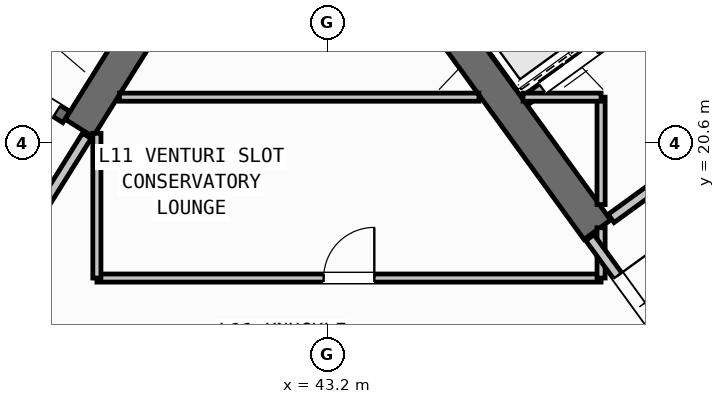
"""IFC4 building model, lengths in metres.
Left out: names, types, materials, properties, quantities, classifications, styles, units other than length and angle.
Written with IfcOpenShell. Run it as: python <this file> out.ifc"""

import sys

from ifc_helpers import new_model, si_unit, direction, frame, frame_2d, origin, place, context, subcontext, project, spatial, rectangle, extrude, source, transform, mapped, element, fill, save


model = new_model("IFC4")
c1 = context("Model", 3, precision=1e-05, world=origin(), true_north=direction((0.0, 1.0)))
c2 = subcontext(c1, "Body", "Model", "MODEL_VIEW")
j1 = project(units=[si_unit("LENGTHUNIT", "METRE"), si_unit("PLANEANGLEUNIT", "RADIAN")], contexts=[c1])
p1 = place(None, origin())
s1 = spatial("IfcSite", under=j1, at=p1, CompositionType="ELEMENT")
p2 = place(p1, origin())
s2 = spatial("IfcBuilding", under=s1, at=p2, CompositionType="ELEMENT")
p3 = place(p2, frame((0.0, 0.0, 45.6)))
s3 = spatial("IfcBuildingStorey", under=s2, at=p3, CompositionType="ELEMENT", Elevation=45.6)
p4 = place(p3, frame((40.168, 23.88, 0.0), z_axis=(0.0, 0.0, 1.0), x_axis=(-0.529893103397, -0.8480644427, 0.0)))
e1 = element("IfcWall", 1, at=p4, inside=s3, PredefinedType="SHEAR", context=c2, shape_type="SweptSolid", body=[
    extrude(rectangle(XDim=3.525, YDim=0.65, at=frame_2d((1.763, 0.0))), origin(), (0.0, 0.0, 1.0), 3.35),
])
p5 = place(p3, frame((48.526, 18.884, 0.0), z_axis=(0.0, 0.0, 1.0), x_axis=(-0.58777996584, 0.809020835181, 0.0)))
e2 = element("IfcWall", 2, at=p5, inside=s3, PredefinedType="SHEAR", context=c2, shape_type="SweptSolid", body=[
    extrude(rectangle(XDim=6.375, YDim=0.65, at=frame_2d((3.188, 0.0))), origin(), (0.0, 0.0, 1.0), 3.35),
])
p6 = place(p3, frame((38.046, 21.108, 0.0), z_axis=(0.0, 0.0, 1.0), x_axis=(-0.848054434086, 0.529909121291, 0.0)))
e3 = element("IfcWall", 3, at=p6, inside=s3, PredefinedType="SHEAR", context=c2, shape_type="SweptSolid", body=[
    extrude(rectangle(XDim=7.33, YDim=0.26, at=frame_2d((3.665, 0.0))), origin(), (0.0, 0.0, 1.0), 3.35),
])
p7 = place(p6, frame((0.22, 0.0, 0.0)))
e4 = element("IfcOpeningElement", 4, at=p7, cuts=e3, PredefinedType="OPENING", context=c2, shape_type="SweptSolid", body=[
    extrude(rectangle(XDim=1.1, YDim=2.1, at=frame_2d((0.55, 1.05))), frame((0.0, 0.14, 0.0), z_axis=(0.0, -1.0, 0.0), x_axis=(1.0, 0.0, 0.0)), (0.0, 0.0, 1.0), 0.28),
])
p8 = place(p3, frame((47.106, 21.437, 0.0), z_axis=(0.0, 0.0, 1.0), x_axis=(0.809012514015, 0.58779141893, 0.0)))
e5 = element("IfcWall", 5, at=p8, inside=s3, PredefinedType="STANDARD", context=c2, shape_type="SweptSolid", body=[
    extrude(rectangle(XDim=3.398, YDim=0.2, at=frame_2d((1.699, 0.0))), origin(), (0.0, 0.0, 1.0), 3.34),
])
p9 = place(p8, frame((0.408, 0.0, 0.0)))
e6 = element("IfcOpeningElement", 6, at=p9, cuts=e5, PredefinedType="OPENING", context=c2, shape_type="SweptSolid", body=[
    extrude(rectangle(XDim=1.3, YDim=2.2, at=frame_2d((0.65, 1.1))), frame((0.0, 0.11, 0.0), z_axis=(0.0, -1.0, 0.0), x_axis=(1.0, 0.0, 0.0)), (0.0, 0.0, 1.0), 0.22),
])
p10 = place(p3, frame((48.799, 19.107, 0.0), z_axis=(0.0, 0.0, 1.0), x_axis=(0.809012959416, 0.587790805897, 0.0)))
e7 = element("IfcWall", 7, at=p10, inside=s3, PredefinedType="STANDARD", context=c2, shape_type="SweptSolid", body=[
    extrude(rectangle(XDim=5.718, YDim=0.2, at=frame_2d((2.859, 0.0))), origin(), (0.0, 0.0, 1.0), 3.34),
])
p11 = place(p10, frame((2.498, 0.0, 0.0)))
e8 = element("IfcOpeningElement", 8, at=p11, cuts=e7, PredefinedType="OPENING", context=c2, shape_type="SweptSolid", body=[
    extrude(rectangle(XDim=1.15, YDim=2.1, at=frame_2d((0.575, 1.05))), frame((0.0, 0.11, 0.0), z_axis=(0.0, -1.0, 0.0), x_axis=(1.0, 0.0, 0.0)), (0.0, 0.0, 1.0), 0.22),
])
p12 = place(p3, frame((38.451, 20.737, 0.0), z_axis=(0.0, 0.0, 1.0), x_axis=(-0.529924799939, -0.848044637038, 0.0)))
e9 = element("IfcWall", 9, at=p12, inside=s3, PredefinedType="STANDARD", context=c2, shape_type="SweptSolid", body=[
    extrude(rectangle(XDim=2.96, YDim=0.2, at=frame_2d((1.48, 0.0))), origin(), (0.0, 0.0, 1.0), 3.34),
])
p13 = place(p12, frame((1.46, 0.0, 0.0)))
e10 = element("IfcOpeningElement", 10, at=p13, cuts=e9, PredefinedType="OPENING", context=c2, shape_type="SweptSolid", body=[
    extrude(rectangle(XDim=0.86, YDim=2.05, at=frame_2d((0.43, 1.025))), frame((0.0, 0.11, 0.0), z_axis=(0.0, -1.0, 0.0), x_axis=(1.0, 0.0, 0.0)), (0.0, 0.0, 1.0), 0.22),
])
p14 = place(p3, frame((38.65, 17.93, 0.0), z_axis=(0.0, 0.0, 1.0), x_axis=(1.0, 0.0, 0.0)))
e11 = element("IfcWall", 11, at=p14, inside=s3, PredefinedType="PARTITIONING", context=c2, shape_type="SweptSolid", body=[
    extrude(rectangle(XDim=9.95, YDim=0.16, at=frame_2d((4.975, 0.0))), origin(), (0.0, 0.0, 1.0), 3.34),
])
p15 = place(p14, frame((4.475, 0.0, 0.0)))
e12 = element("IfcOpeningElement", 12, at=p15, cuts=e11, PredefinedType="OPENING", context=c2, shape_type="SweptSolid", body=[
    extrude(rectangle(XDim=1.0, YDim=2.1, at=frame_2d((0.5, 1.05))), frame((0.0, 0.09, 0.0), z_axis=(0.0, -1.0, 0.0), x_axis=(1.0, 0.0, 0.0)), (0.0, 0.0, 1.0), 0.18),
])
p16 = place(p3, frame((38.65, 17.93, 0.0), z_axis=(0.0, 0.0, 1.0), x_axis=(0.0, 1.0, 0.0)))
e13 = element("IfcWall", 13, at=p16, inside=s3, PredefinedType="PARTITIONING", context=c2, shape_type="SweptSolid", body=[
    extrude(rectangle(XDim=2.857, YDim=0.16, at=frame_2d((1.428, 0.0))), origin(), (0.0, 0.0, 1.0), 3.34),
])
p17 = place(p3, frame((48.6, 17.93, 0.0), z_axis=(0.0, 0.0, 1.0), x_axis=(0.0, 1.0, 0.0)))
e14 = element("IfcWall", 14, at=p17, inside=s3, PredefinedType="PARTITIONING", context=c2, shape_type="SweptSolid", body=[
    extrude(rectangle(XDim=0.993, YDim=0.16, at=frame_2d((0.496, 0.0))), origin(), (0.0, 0.0, 1.0), 3.34),
])
p18 = place(p3, frame((48.6, 19.38, 0.0), z_axis=(0.0, 0.0, 1.0), x_axis=(0.0, 1.0, 0.0)))
e15 = element("IfcWall", 15, at=p18, inside=s3, PredefinedType="PARTITIONING", context=c2, shape_type="SweptSolid", body=[
    extrude(rectangle(XDim=2.12, YDim=0.16, at=frame_2d((1.06, 0.0))), origin(), (0.0, 0.0, 1.0), 3.34),
])
p19 = place(p3, frame((39.095, 21.5, 0.0), z_axis=(0.0, 0.0, 1.0), x_axis=(1.0, 0.0, 0.0)))
e16 = element("IfcWall", 16, at=p19, inside=s3, PredefinedType="PARTITIONING", context=c2, shape_type="SweptSolid", body=[
    extrude(rectangle(XDim=7.094, YDim=0.16, at=frame_2d((3.547, 0.0))), origin(), (0.0, 0.0, 1.0), 3.34),
])
p20 = place(p3, frame((47.06, 21.5, 0.0), z_axis=(0.0, 0.0, 1.0), x_axis=(1.0, 0.0, 0.0)))
e17 = element("IfcWall", 17, at=p20, inside=s3, PredefinedType="PARTITIONING", context=c2, shape_type="SweptSolid", body=[
    extrude(rectangle(XDim=1.54, YDim=0.16, at=frame_2d((0.77, 0.0))), origin(), (0.0, 0.0, 1.0), 3.34),
])
p21 = place(p3, frame((50.119, 16.333, 0.0), z_axis=(0.0, 0.0, 1.0), x_axis=(-0.587749856981, 0.809042709391, 0.0)))
e18 = element("IfcWall", 18, at=p21, inside=s3, PredefinedType="STANDARD", context=c2, shape_type="SweptSolid", body=[
    extrude(rectangle(XDim=2.96, YDim=0.2, at=frame_2d((1.48, 0.0))), origin(), (0.0, 0.0, 1.0), 3.34),
])
p22 = place(p21, frame((0.53, 0.0, 0.0)))
e19 = element("IfcOpeningElement", 19, at=p22, cuts=e18, PredefinedType="OPENING", context=c2, shape_type="SweptSolid", body=[
    extrude(rectangle(XDim=1.5, YDim=2.15, at=frame_2d((0.75, 1.075))), frame((0.0, 0.11, 0.0), z_axis=(0.0, -1.0, 0.0), x_axis=(1.0, 0.0, 0.0)), (0.0, 0.0, 1.0), 0.22),
])
m1 = source(origin(), c2, "Body", "SweptSolid", [
    extrude(rectangle(XDim=1.1, YDim=2.1, at=frame_2d((0.55, 1.05))), frame((0.0, 0.025, 0.0), z_axis=(0.0, -1.0, 0.0), x_axis=(1.0, 0.0, 0.0)), (0.0, 0.0, 1.0), 0.05),
])
p23 = place(p7, origin())
e20 = element("IfcDoor", 20, at=p23, inside=s3, OperationType="SINGLE_SWING_RIGHT", PredefinedType="DOOR", context=c2, shape_type="MappedRepresentation", body=[
    mapped(m1, transform((0.0, 0.0, 0.0), scale=1.0)),
])
fill(e4, e20)
m2 = source(origin(), c2, "Body", "SweptSolid", [
    extrude(rectangle(XDim=1.3, YDim=2.2, at=frame_2d((0.65, 1.1))), frame((0.0, 0.025, 0.0), z_axis=(0.0, -1.0, 0.0), x_axis=(1.0, 0.0, 0.0)), (0.0, 0.0, 1.0), 0.05),
])
p24 = place(p9, origin())
e21 = element("IfcDoor", 21, at=p24, inside=s3, OperationType="DOUBLE_DOOR_SLIDING", PredefinedType="DOOR", context=c2, shape_type="MappedRepresentation", body=[
    mapped(m2, transform((0.0, 0.0, 0.0), scale=1.0)),
])
fill(e6, e21)
m3 = source(origin(), c2, "Body", "SweptSolid", [
    extrude(rectangle(XDim=1.0, YDim=2.1, at=frame_2d((0.5, 1.05))), frame((0.0, 0.025, 0.0), z_axis=(0.0, -1.0, 0.0), x_axis=(1.0, 0.0, 0.0)), (0.0, 0.0, 1.0), 0.05),
])
p25 = place(p15, origin())
e22 = element("IfcDoor", 22, at=p25, inside=s3, OperationType="SINGLE_SWING_RIGHT", PredefinedType="DOOR", context=c2, shape_type="MappedRepresentation", body=[
    mapped(m3, transform((0.0, 0.0, 0.0), scale=1.0)),
])
fill(e12, e22)
m4 = source(origin(), c2, "Body", "SweptSolid", [
    extrude(rectangle(XDim=1.5, YDim=2.15, at=frame_2d((0.75, 1.075))), frame((0.0, 0.025, 0.0), z_axis=(0.0, -1.0, 0.0), x_axis=(1.0, 0.0, 0.0)), (0.0, 0.0, 1.0), 0.05),
])
p26 = place(p22, frame((1.5, 0.0, 0.0), z_axis=(0.0, 0.0, 1.0), x_axis=(-1.0, 0.0, 0.0)))
e23 = element("IfcDoor", 23, at=p26, inside=s3, OperationType="DOUBLE_DOOR_SINGLE_SWING", PredefinedType="DOOR", context=c2, shape_type="MappedRepresentation", body=[
    mapped(m4, transform((0.0, 0.0, 0.0), scale=1.0)),
])
fill(e19, e23)
save(model, sys.argv[1])
